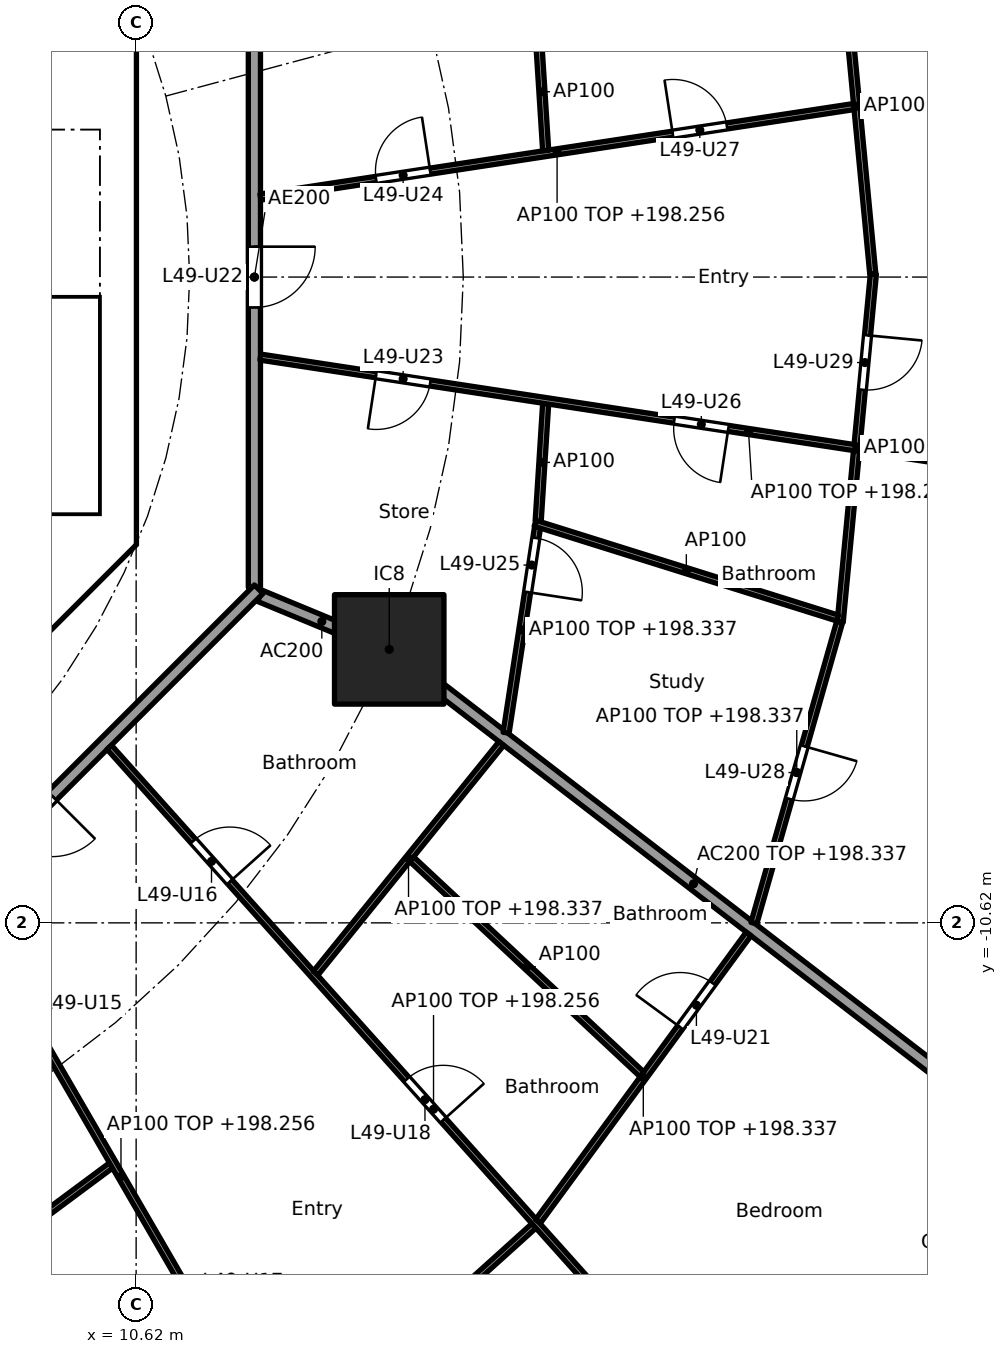
"""IFC4 building model, lengths in metres.
Left out: names, types, materials, properties, quantities, classifications, styles, units other than length and angle.
Written with IfcOpenShell. Run it as: python <this file> out.ifc"""

import sys

from ifc_helpers import new_model, si_unit, direction, frame, frame_2d, origin, origin_2d, place, context, subcontext, project, spatial, polyline, rectangle, outline, extrude, element, fill, save


model = new_model("IFC4")
c1 = context("Model", 3, precision=1e-05, world=origin(), true_north=direction((0.0, 1.0)))
c2 = subcontext(c1, "Body", "Model", "MODEL_VIEW")
j1 = project(units=[si_unit("LENGTHUNIT", "METRE"), si_unit("PLANEANGLEUNIT", "RADIAN")], contexts=[c1])
p1 = place(None, origin())
s1 = spatial("IfcSite", under=j1, at=p1, CompositionType="ELEMENT")
p2 = place(p1, origin())
s2 = spatial("IfcBuilding", under=s1, at=p2, CompositionType="ELEMENT")
p3 = place(p2, frame((0.0, 0.0, 195.5)))
s3 = spatial("IfcBuildingStorey", under=s2, at=p3, CompositionType="ELEMENT", Elevation=195.5)
p4 = place(p3, frame((14.782, -6.123, 0.0), z_axis=(0.0, 0.0, 1.0), x_axis=(1.0, 0.0, 0.0)))
e1 = element("IfcColumn", 1, at=p4, inside=s3, PredefinedType="COLUMN", context=c2, shape_type="SweptSolid", body=[
    extrude(rectangle(XDim=1.8, YDim=1.8, at=origin_2d()), origin(), (0.0, 0.0, 1.0), 3.7),
])
p5 = place(p3, frame((4.613, -9.988, 0.0), z_axis=(0.0, 0.0, 1.0), x_axis=(0.707106781187, 0.707106781187, 0.0)))
e2 = element("IfcWall", 2, at=p5, inside=s3, PredefinedType="SHEAR", context=c2, shape_type="SweptSolid", body=[
    extrude(rectangle(XDim=7.602, YDim=0.6, at=frame_2d((3.801, 0.0))), origin(), (0.0, 0.0, 1.0), 3.44),
])
p6 = place(p5, frame((3.201, 0.0, 0.0)))
e3 = element("IfcOpeningElement", 3, at=p6, cuts=e2, PredefinedType="OPENING", context=c2, shape_type="SweptSolid", body=[
    extrude(rectangle(XDim=1.2, YDim=2.1, at=frame_2d((0.6, 1.05))), frame((0.0, 0.31, 0.0), z_axis=(0.0, -1.0, 0.0), x_axis=(1.0, 0.0, 0.0)), (0.0, 0.0, 1.0), 0.62),
])
p7 = place(p3, origin())
e4 = element("IfcWall", 4, at=p7, inside=s3, PredefinedType="SHEAR", context=c2, shape_type="SweptSolid", body=[
    extrude(outline(polyline([(9.776, -4.401), (10.025, -4.152), (10.025, -3.801), (10.025, 4.152), (9.776, 4.401), (10.2, 4.825), (10.625, 4.401), (10.625, -4.401), (10.2, -4.825), (9.776, -4.401)])), origin(), (0.0, 0.0, 1.0), 3.44),
])
p8 = place(p3, origin())
e5 = element("IfcWall", 5, at=p8, inside=s3, PredefinedType="SOLIDWALL", context=c2, shape_type="SweptSolid", body=[
    extrude(outline(polyline([(10.025, -4.1), (6.7, -4.1), (6.7, -3.9), (10.025, -3.9), (10.025, -4.1)])), origin(), (0.0, 0.0, 1.0), 3.44),
])
p9 = place(p3, frame((6.138, -14.83, 0.0), z_axis=(0.0, 0.0, 1.0), x_axis=(0.294818517221, -0.955553264818, 0.0)))
e6 = element("IfcWall", 6, at=p9, inside=s3, PredefinedType="PARTITIONING", context=c2, shape_type="SweptSolid", body=[
    extrude(rectangle(XDim=12.619, YDim=0.2, at=frame_2d((6.31, 0.0))), origin(), (0.0, 0.0, 1.0), 2.837),
])
p10 = place(p3, frame((12.657, -5.243, 0.0), z_axis=(0.0, 0.0, 1.0), x_axis=(0.92383017907, -0.382802560388, 0.0)))
e7 = element("IfcWall", 7, at=p10, inside=s3, PredefinedType="PARTITIONING", context=c2, shape_type="SweptSolid", body=[
    extrude(rectangle(XDim=2.2, YDim=0.2, at=frame_2d((1.1, 0.0))), origin(), (0.0, 0.0, 1.0), 3.44),
])
p11 = place(p3, frame((14.822, -6.154, 0.0), z_axis=(0.0, 0.0, 1.0), x_axis=(0.792203056092, -0.610257583254, 0.0)))
e8 = element("IfcWall", 8, at=p11, inside=s3, PredefinedType="PARTITIONING", context=c2, shape_type="SweptSolid", body=[
    extrude(rectangle(XDim=12.533, YDim=0.2, at=frame_2d((6.266, 0.0))), origin(), (0.0, 0.0, 1.0), 2.837),
])
p12 = place(p3, frame((12.565, -5.104, 0.0), z_axis=(0.0, 0.0, 1.0), x_axis=(0.0, 1.0, 0.0)))
e9 = element("IfcWall", 9, at=p12, inside=s3, PredefinedType="PARTITIONING", context=c2, shape_type="SweptSolid", body=[
    extrude(rectangle(XDim=10.209, YDim=0.2, at=frame_2d((5.104, 0.0))), origin(), (0.0, 0.0, 1.0), 3.44),
])
p13 = place(p12, frame((4.604, 0.0, 0.0)))
e10 = element("IfcOpeningElement", 10, at=p13, cuts=e9, PredefinedType="OPENING", context=c2, shape_type="SweptSolid", body=[
    extrude(rectangle(XDim=1.0, YDim=2.1, at=frame_2d((0.5, 1.05))), frame((0.0, 0.11, 0.0), z_axis=(0.0, -1.0, 0.0), x_axis=(1.0, 0.0, 0.0)), (0.0, 0.0, 1.0), 0.22),
])
p14 = place(p3, frame((5.275, -12.494, 0.0), z_axis=(0.0, 0.0, 1.0), x_axis=(0.707106781187, 0.707106781187, 0.0)))
e11 = element("IfcWall", 11, at=p14, inside=s3, PredefinedType="PARTITIONING", context=c2, shape_type="SweptSolid", body=[
    extrude(rectangle(XDim=10.409, YDim=0.2, at=frame_2d((5.205, 0.0))), origin(), (0.0, 0.0, 1.0), 3.44),
])
p15 = place(p14, frame((4.604, 0.0, 0.0)))
e12 = element("IfcOpeningElement", 12, at=p15, cuts=e11, PredefinedType="OPENING", context=c2, shape_type="SweptSolid", body=[
    extrude(rectangle(XDim=1.0, YDim=2.1, at=frame_2d((0.5, 1.05))), frame((0.0, 0.11, 0.0), z_axis=(0.0, -1.0, 0.0), x_axis=(1.0, 0.0, 0.0)), (0.0, 0.0, 1.0), 0.22),
])
p16 = place(p3, frame((22.734, 0.05, 0.0), z_axis=(0.0, 0.0, 1.0), x_axis=(-0.094923312677, 0.995484587882, 0.0)))
e13 = element("IfcWall", 13, at=p16, inside=s3, PredefinedType="PARTITIONING", context=c2, shape_type="SweptSolid", body=[
    extrude(rectangle(XDim=5.548, YDim=0.1, at=frame_2d((2.774, 0.0))), origin(), (0.0, 0.0, 1.0), 2.837),
])
p17 = place(p3, frame((22.744, 0.05, 0.0), z_axis=(0.0, 0.0, 1.0), x_axis=(-0.094931362305, -0.995483820286, 0.0)))
e14 = element("IfcWall", 14, at=p17, inside=s3, PredefinedType="PARTITIONING", context=c2, shape_type="SweptSolid", body=[
    extrude(rectangle(XDim=5.748, YDim=0.1, at=frame_2d((2.874, 0.0))), origin(), (0.0, 0.0, 1.0), 2.837),
])
p18 = place(p17, frame((1.012, 0.0, 0.0)))
e15 = element("IfcOpeningElement", 15, at=p18, cuts=e14, PredefinedType="OPENING", context=c2, shape_type="SweptSolid", body=[
    extrude(rectangle(XDim=0.9, YDim=2.1, at=frame_2d((0.45, 1.05))), frame((0.0, 0.06, 0.0), z_axis=(0.0, -1.0, 0.0), x_axis=(1.0, 0.0, 0.0)), (0.0, 0.0, 1.0), 0.12),
])
p19 = place(p3, frame((12.664, 1.316, 0.0), z_axis=(0.0, 0.0, 1.0), x_axis=(0.988579217853, 0.150702123505, 0.0)))
e16 = element("IfcWall", 16, at=p19, inside=s3, PredefinedType="PARTITIONING", context=c2, shape_type="SweptSolid", body=[
    extrude(rectangle(XDim=9.871, YDim=0.1, at=frame_2d((4.936, 0.0))), origin(), (0.0, 0.0, 1.0), 2.756),
])
p20 = place(p19, frame((1.924, 0.0, 0.0)))
e17 = element("IfcOpeningElement", 17, at=p20, cuts=e16, PredefinedType="OPENING", context=c2, shape_type="SweptSolid", body=[
    extrude(rectangle(XDim=0.9, YDim=2.1, at=frame_2d((0.45, 1.05))), frame((0.0, 0.06, 0.0), z_axis=(0.0, -1.0, 0.0), x_axis=(1.0, 0.0, 0.0)), (0.0, 0.0, 1.0), 0.12),
])
p21 = place(p19, frame((6.86, 0.0, 0.0)))
e18 = element("IfcOpeningElement", 18, at=p21, cuts=e16, PredefinedType="OPENING", context=c2, shape_type="SweptSolid", body=[
    extrude(rectangle(XDim=0.9, YDim=2.1, at=frame_2d((0.45, 1.05))), frame((0.0, 0.06, 0.0), z_axis=(0.0, -1.0, 0.0), x_axis=(1.0, 0.0, 0.0)), (0.0, 0.0, 1.0), 0.12),
])
p22 = place(p3, frame((17.355, 2.082, 0.0), z_axis=(0.0, 0.0, 1.0), x_axis=(-0.063689464349, 0.997969765139, 0.0)))
e19 = element("IfcWall", 19, at=p22, inside=s3, PredefinedType="PARTITIONING", context=c2, shape_type="SweptSolid", body=[
    extrude(rectangle(XDim=1.936, YDim=0.1, at=frame_2d((0.968, 0.0))), origin(), (0.0, 0.0, 1.0), 3.44),
])
p23 = place(p3, frame((6.921, -17.05, 0.0), z_axis=(0.0, 0.0, 1.0), x_axis=(0.802769141821, 0.596289950394, 0.0)))
e20 = element("IfcWall", 20, at=p23, inside=s3, PredefinedType="PARTITIONING", context=c2, shape_type="SweptSolid", body=[
    extrude(rectangle(XDim=4.092, YDim=0.1, at=frame_2d((2.046, 0.0))), origin(), (0.0, 0.0, 1.0), 2.837),
])
p24 = place(p3, frame((7.708, -10.198, 0.0), z_axis=(0.0, 0.0, 1.0), x_axis=(0.501288100085, -0.865280440501, 0.0)))
e21 = element("IfcWall", 21, at=p24, inside=s3, PredefinedType="PARTITIONING", context=c2, shape_type="SweptSolid", body=[
    extrude(rectangle(XDim=10.623, YDim=0.1, at=frame_2d((5.312, 0.0))), origin(), (0.0, 0.0, 1.0), 2.756),
])
p25 = place(p24, frame((2.082, 0.0, 0.0)))
e22 = element("IfcOpeningElement", 22, at=p25, cuts=e21, PredefinedType="OPENING", context=c2, shape_type="SweptSolid", body=[
    extrude(rectangle(XDim=0.9, YDim=2.1, at=frame_2d((0.45, 1.05))), frame((0.0, 0.06, 0.0), z_axis=(0.0, -1.0, 0.0), x_axis=(1.0, 0.0, 0.0)), (0.0, 0.0, 1.0), 0.12),
])
p26 = place(p24, frame((7.369, 0.0, 0.0)))
e23 = element("IfcOpeningElement", 23, at=p26, cuts=e21, PredefinedType="OPENING", context=c2, shape_type="SweptSolid", body=[
    extrude(rectangle(XDim=0.9, YDim=2.1, at=frame_2d((0.45, 1.05))), frame((0.0, 0.06, 0.0), z_axis=(0.0, -1.0, 0.0), x_axis=(1.0, 0.0, 0.0)), (0.0, 0.0, 1.0), 0.12),
])
p27 = place(p3, frame((13.045, -19.313, 0.0), z_axis=(0.0, 0.0, 1.0), x_axis=(0.742790086539, 0.66952437397, 0.0)))
e24 = element("IfcWall", 24, at=p27, inside=s3, PredefinedType="PARTITIONING", context=c2, shape_type="SweptSolid", body=[
    extrude(rectangle(XDim=5.542, YDim=0.1, at=frame_2d((2.771, 0.0))), origin(), (0.0, 0.0, 1.0), 2.837),
])
p28 = place(p27, frame((2.321, 0.0, 0.0)))
e25 = element("IfcOpeningElement", 25, at=p28, cuts=e24, PredefinedType="OPENING", context=c2, shape_type="SweptSolid", body=[
    extrude(rectangle(XDim=0.9, YDim=2.1, at=frame_2d((0.45, 1.05))), frame((0.0, 0.06, 0.0), z_axis=(0.0, -1.0, 0.0), x_axis=(1.0, 0.0, 0.0)), (0.0, 0.0, 1.0), 0.12),
])
p29 = place(p3, frame((10.178, -7.732, 0.0), z_axis=(0.0, 0.0, 1.0), x_axis=(0.667283629999, -0.74480370376, 0.0)))
e26 = element("IfcWall", 26, at=p29, inside=s3, PredefinedType="PARTITIONING", context=c2, shape_type="SweptSolid", body=[
    extrude(rectangle(XDim=15.983, YDim=0.1, at=frame_2d((7.992, 0.0))), origin(), (0.0, 0.0, 1.0), 2.756),
])
p30 = place(p29, frame((2.07, 0.0, 0.0)))
e27 = element("IfcOpeningElement", 27, at=p30, cuts=e26, PredefinedType="OPENING", context=c2, shape_type="SweptSolid", body=[
    extrude(rectangle(XDim=0.9, YDim=2.1, at=frame_2d((0.45, 1.05))), frame((0.0, 0.06, 0.0), z_axis=(0.0, -1.0, 0.0), x_axis=(1.0, 0.0, 0.0)), (0.0, 0.0, 1.0), 0.12),
])
p31 = place(p29, frame((7.331, 0.0, 0.0)))
e28 = element("IfcOpeningElement", 28, at=p31, cuts=e26, PredefinedType="OPENING", context=c2, shape_type="SweptSolid", body=[
    extrude(rectangle(XDim=0.9, YDim=2.1, at=frame_2d((0.45, 1.05))), frame((0.0, 0.06, 0.0), z_axis=(0.0, -1.0, 0.0), x_axis=(1.0, 0.0, 0.0)), (0.0, 0.0, 1.0), 0.12),
])
p32 = place(p29, frame((12.802, 0.0, 0.0)))
e29 = element("IfcOpeningElement", 29, at=p32, cuts=e26, PredefinedType="OPENING", context=c2, shape_type="SweptSolid", body=[
    extrude(rectangle(XDim=0.9, YDim=2.1, at=frame_2d((0.45, 1.05))), frame((0.0, 0.06, 0.0), z_axis=(0.0, -1.0, 0.0), x_axis=(1.0, 0.0, 0.0)), (0.0, 0.0, 1.0), 0.12),
])
p33 = place(p3, frame((13.572, -11.447, 0.0), z_axis=(0.0, 0.0, 1.0), x_axis=(0.628738316533, 0.777616955399, 0.0)))
e30 = element("IfcWall", 30, at=p33, inside=s3, PredefinedType="PARTITIONING", context=c2, shape_type="SweptSolid", body=[
    extrude(rectangle(XDim=4.857, YDim=0.1, at=frame_2d((2.429, 0.0))), origin(), (0.0, 0.0, 1.0), 2.837),
])
p34 = place(p3, frame((17.229, -15.529, 0.0), z_axis=(0.0, 0.0, 1.0), x_axis=(0.591110768293, 0.806590391468, 0.0)))
e31 = element("IfcWall", 31, at=p34, inside=s3, PredefinedType="PARTITIONING", context=c2, shape_type="SweptSolid", body=[
    extrude(rectangle(XDim=5.86, YDim=0.1, at=frame_2d((2.93, 0.0))), origin(), (0.0, 0.0, 1.0), 2.837),
])
p35 = place(p34, frame((3.958, 0.0, 0.0)))
e32 = element("IfcOpeningElement", 32, at=p35, cuts=e31, PredefinedType="OPENING", context=c2, shape_type="SweptSolid", body=[
    extrude(rectangle(XDim=0.9, YDim=2.1, at=frame_2d((0.45, 1.05))), frame((0.0, 0.06, 0.0), z_axis=(0.0, -1.0, 0.0), x_axis=(1.0, 0.0, 0.0)), (0.0, 0.0, 1.0), 0.12),
])
p36 = place(p3, frame((15.152, -9.573, 0.0), z_axis=(0.0, 0.0, 1.0), x_axis=(0.730723083214, -0.682673989294, 0.0)))
e33 = element("IfcWall", 33, at=p36, inside=s3, PredefinedType="PARTITIONING", context=c2, shape_type="SweptSolid", body=[
    extrude(rectangle(XDim=5.183, YDim=0.1, at=frame_2d((2.591, 0.0))), origin(), (0.0, 0.0, 1.0), 3.44),
])
p37 = place(p3, frame((16.704, -7.493, 0.0), z_axis=(0.0, 0.0, 1.0), x_axis=(0.1510806336, 0.988521442434, 0.0)))
e34 = element("IfcWall", 34, at=p37, inside=s3, PredefinedType="PARTITIONING", context=c2, shape_type="SweptSolid", body=[
    extrude(rectangle(XDim=3.419, YDim=0.1, at=frame_2d((1.71, 0.0))), origin(), (0.0, 0.0, 1.0), 2.837),
])
p38 = place(p37, frame((2.339, 0.0, 0.0)))
e35 = element("IfcOpeningElement", 35, at=p38, cuts=e34, PredefinedType="OPENING", context=c2, shape_type="SweptSolid", body=[
    extrude(rectangle(XDim=0.9, YDim=2.1, at=frame_2d((0.45, 1.05))), frame((0.0, 0.06, 0.0), z_axis=(0.0, -1.0, 0.0), x_axis=(1.0, 0.0, 0.0)), (0.0, 0.0, 1.0), 0.12),
])
p39 = place(p3, frame((20.779, -10.625, 0.0), z_axis=(0.0, 0.0, 1.0), x_axis=(0.273819702124, 0.961781040949, 0.0)))
e36 = element("IfcWall", 36, at=p39, inside=s3, PredefinedType="PARTITIONING", context=c2, shape_type="SweptSolid", body=[
    extrude(rectangle(XDim=5.152, YDim=0.1, at=frame_2d((2.576, 0.0))), origin(), (0.0, 0.0, 1.0), 2.837),
])
p40 = place(p39, frame((2.126, 0.0, 0.0)))
e37 = element("IfcOpeningElement", 37, at=p40, cuts=e36, PredefinedType="OPENING", context=c2, shape_type="SweptSolid", body=[
    extrude(rectangle(XDim=0.9, YDim=2.1, at=frame_2d((0.45, 1.05))), frame((0.0, 0.06, 0.0), z_axis=(0.0, -1.0, 0.0), x_axis=(1.0, 0.0, 0.0)), (0.0, 0.0, 1.0), 0.12),
])
p41 = place(p3, frame((17.181, -4.049, 0.0), z_axis=(0.0, 0.0, 1.0), x_axis=(0.954246359918, -0.299021545351, 0.0)))
e38 = element("IfcWall", 38, at=p41, inside=s3, PredefinedType="PARTITIONING", context=c2, shape_type="SweptSolid", body=[
    extrude(rectangle(XDim=5.213, YDim=0.1, at=frame_2d((2.606, 0.0))), origin(), (0.0, 0.0, 1.0), 3.44),
])
p42 = place(p3, frame((17.232, -4.014, 0.0), z_axis=(0.0, 0.0, 1.0), x_axis=(0.063689464349, 0.997969765139, 0.0)))
e39 = element("IfcWall", 39, at=p42, inside=s3, PredefinedType="PARTITIONING", context=c2, shape_type="SweptSolid", body=[
    extrude(rectangle(XDim=1.936, YDim=0.1, at=frame_2d((0.968, 0.0))), origin(), (0.0, 0.0, 1.0), 3.44),
])
p43 = place(p3, frame((12.664, -1.316, 0.0), z_axis=(0.0, 0.0, 1.0), x_axis=(0.988585177081, -0.150663026836, 0.0)))
e40 = element("IfcWall", 40, at=p43, inside=s3, PredefinedType="PARTITIONING", context=c2, shape_type="SweptSolid", body=[
    extrude(rectangle(XDim=16.24, YDim=0.1, at=frame_2d((8.12, 0.0))), origin(), (0.0, 0.0, 1.0), 2.756),
])
p44 = place(p43, frame((1.924, 0.0, 0.0)))
e41 = element("IfcOpeningElement", 41, at=p44, cuts=e40, PredefinedType="OPENING", context=c2, shape_type="SweptSolid", body=[
    extrude(rectangle(XDim=0.9, YDim=2.1, at=frame_2d((0.45, 1.05))), frame((0.0, 0.06, 0.0), z_axis=(0.0, -1.0, 0.0), x_axis=(1.0, 0.0, 0.0)), (0.0, 0.0, 1.0), 0.12),
])
p45 = place(p43, frame((6.885, 0.0, 0.0)))
e42 = element("IfcOpeningElement", 42, at=p45, cuts=e40, PredefinedType="OPENING", context=c2, shape_type="SweptSolid", body=[
    extrude(rectangle(XDim=0.9, YDim=2.1, at=frame_2d((0.45, 1.05))), frame((0.0, 0.06, 0.0), z_axis=(0.0, -1.0, 0.0), x_axis=(1.0, 0.0, 0.0)), (0.0, 0.0, 1.0), 0.12),
])
p46 = place(p15, frame((1.0, 0.0, 0.0), x_axis=(-1.0, 0.0, 0.0)))
e43 = element("IfcDoor", 43, at=p46, inside=s3, OperationType="SINGLE_SWING_LEFT", PredefinedType="DOOR", context=c2, shape_type="SweptSolid", body=[
    extrude(rectangle(XDim=1.0, YDim=2.1, at=frame_2d((0.5, 1.05))), frame((0.0, 0.025, 0.0), z_axis=(0.0, -1.0, 0.0), x_axis=(1.0, 0.0, 0.0)), (0.0, 0.0, 1.0), 0.05),
])
fill(e12, e43)
p47 = place(p30, origin())
e44 = element("IfcDoor", 44, at=p47, inside=s3, OperationType="SINGLE_SWING_RIGHT", PredefinedType="DOOR", context=c2, shape_type="SweptSolid", body=[
    extrude(rectangle(XDim=0.9, YDim=2.1, at=frame_2d((0.45, 1.05))), frame((0.0, 0.025, 0.0), z_axis=(0.0, -1.0, 0.0), x_axis=(1.0, 0.0, 0.0)), (0.0, 0.0, 1.0), 0.05),
])
fill(e27, e44)
p48 = place(p31, origin())
e45 = element("IfcDoor", 45, at=p48, inside=s3, OperationType="SINGLE_SWING_RIGHT", PredefinedType="DOOR", context=c2, shape_type="SweptSolid", body=[
    extrude(rectangle(XDim=0.9, YDim=2.1, at=frame_2d((0.45, 1.05))), frame((0.0, 0.025, 0.0), z_axis=(0.0, -1.0, 0.0), x_axis=(1.0, 0.0, 0.0)), (0.0, 0.0, 1.0), 0.05),
])
fill(e28, e45)
p49 = place(p35, origin())
e46 = element("IfcDoor", 46, at=p49, inside=s3, OperationType="SINGLE_SWING_LEFT", PredefinedType="DOOR", context=c2, shape_type="SweptSolid", body=[
    extrude(rectangle(XDim=0.9, YDim=2.1, at=frame_2d((0.45, 1.05))), frame((0.0, 0.025, 0.0), z_axis=(0.0, -1.0, 0.0), x_axis=(1.0, 0.0, 0.0)), (0.0, 0.0, 1.0), 0.05),
])
fill(e32, e46)
p50 = place(p13, frame((1.0, 0.0, 0.0), x_axis=(-1.0, 0.0, 0.0)))
e47 = element("IfcDoor", 47, at=p50, inside=s3, OperationType="SINGLE_SWING_LEFT", PredefinedType="DOOR", context=c2, shape_type="SweptSolid", body=[
    extrude(rectangle(XDim=1.0, YDim=2.1, at=frame_2d((0.5, 1.05))), frame((0.0, 0.025, 0.0), z_axis=(0.0, -1.0, 0.0), x_axis=(1.0, 0.0, 0.0)), (0.0, 0.0, 1.0), 0.05),
])
fill(e10, e47)
p51 = place(p44, frame((0.9, 0.0, 0.0), x_axis=(-1.0, 0.0, 0.0)))
e48 = element("IfcDoor", 48, at=p51, inside=s3, OperationType="SINGLE_SWING_RIGHT", PredefinedType="DOOR", context=c2, shape_type="SweptSolid", body=[
    extrude(rectangle(XDim=0.9, YDim=2.1, at=frame_2d((0.45, 1.05))), frame((0.0, 0.025, 0.0), z_axis=(0.0, -1.0, 0.0), x_axis=(1.0, 0.0, 0.0)), (0.0, 0.0, 1.0), 0.05),
])
fill(e41, e48)
p52 = place(p20, origin())
e49 = element("IfcDoor", 49, at=p52, inside=s3, OperationType="SINGLE_SWING_RIGHT", PredefinedType="DOOR", context=c2, shape_type="SweptSolid", body=[
    extrude(rectangle(XDim=0.9, YDim=2.1, at=frame_2d((0.45, 1.05))), frame((0.0, 0.025, 0.0), z_axis=(0.0, -1.0, 0.0), x_axis=(1.0, 0.0, 0.0)), (0.0, 0.0, 1.0), 0.05),
])
fill(e17, e49)
p53 = place(p38, frame((0.9, 0.0, 0.0), x_axis=(-1.0, 0.0, 0.0)))
e50 = element("IfcDoor", 50, at=p53, inside=s3, OperationType="SINGLE_SWING_RIGHT", PredefinedType="DOOR", context=c2, shape_type="SweptSolid", body=[
    extrude(rectangle(XDim=0.9, YDim=2.1, at=frame_2d((0.45, 1.05))), frame((0.0, 0.025, 0.0), z_axis=(0.0, -1.0, 0.0), x_axis=(1.0, 0.0, 0.0)), (0.0, 0.0, 1.0), 0.05),
])
fill(e35, e50)
p54 = place(p45, frame((0.9, 0.0, 0.0), x_axis=(-1.0, 0.0, 0.0)))
e51 = element("IfcDoor", 51, at=p54, inside=s3, OperationType="SINGLE_SWING_LEFT", PredefinedType="DOOR", context=c2, shape_type="SweptSolid", body=[
    extrude(rectangle(XDim=0.9, YDim=2.1, at=frame_2d((0.45, 1.05))), frame((0.0, 0.025, 0.0), z_axis=(0.0, -1.0, 0.0), x_axis=(1.0, 0.0, 0.0)), (0.0, 0.0, 1.0), 0.05),
])
fill(e42, e51)
p55 = place(p21, origin())
e52 = element("IfcDoor", 52, at=p55, inside=s3, OperationType="SINGLE_SWING_LEFT", PredefinedType="DOOR", context=c2, shape_type="SweptSolid", body=[
    extrude(rectangle(XDim=0.9, YDim=2.1, at=frame_2d((0.45, 1.05))), frame((0.0, 0.025, 0.0), z_axis=(0.0, -1.0, 0.0), x_axis=(1.0, 0.0, 0.0)), (0.0, 0.0, 1.0), 0.05),
])
fill(e18, e52)
p56 = place(p40, frame((0.9, 0.0, 0.0), x_axis=(-1.0, 0.0, 0.0)))
e53 = element("IfcDoor", 53, at=p56, inside=s3, OperationType="SINGLE_SWING_LEFT", PredefinedType="DOOR", context=c2, shape_type="SweptSolid", body=[
    extrude(rectangle(XDim=0.9, YDim=2.1, at=frame_2d((0.45, 1.05))), frame((0.0, 0.025, 0.0), z_axis=(0.0, -1.0, 0.0), x_axis=(1.0, 0.0, 0.0)), (0.0, 0.0, 1.0), 0.05),
])
fill(e37, e53)
p57 = place(p18, origin())
e54 = element("IfcDoor", 54, at=p57, inside=s3, OperationType="SINGLE_SWING_LEFT", PredefinedType="DOOR", context=c2, shape_type="SweptSolid", body=[
    extrude(rectangle(XDim=0.9, YDim=2.1, at=frame_2d((0.45, 1.05))), frame((0.0, 0.025, 0.0), z_axis=(0.0, -1.0, 0.0), x_axis=(1.0, 0.0, 0.0)), (0.0, 0.0, 1.0), 0.05),
])
fill(e15, e54)
save(model, sys.argv[1])
